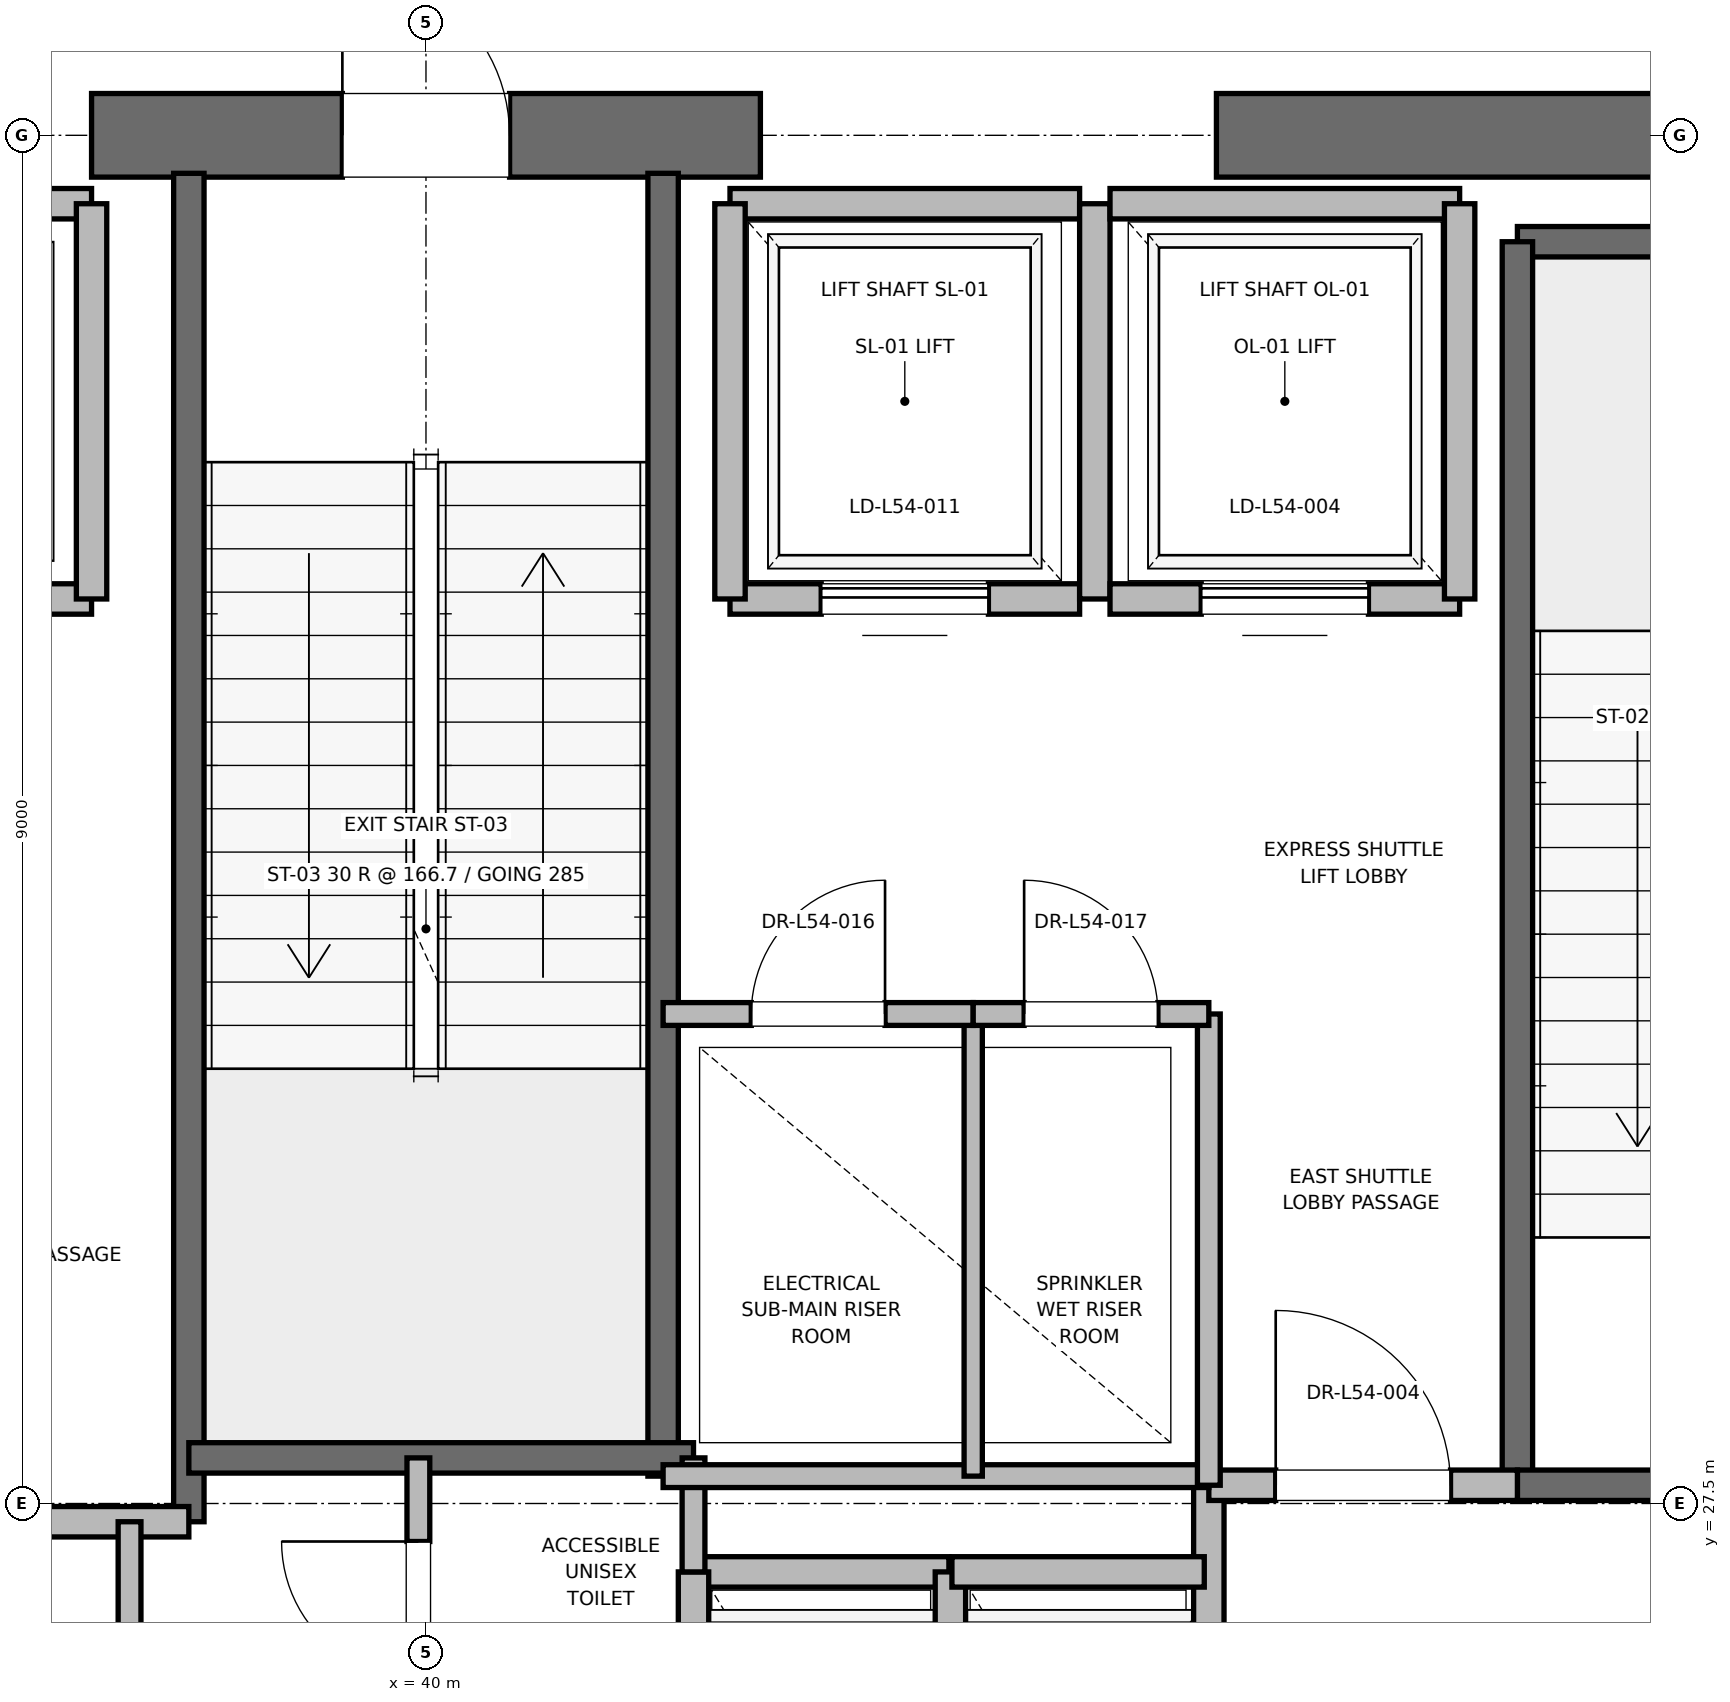
"""IFC4 building model, lengths in metres.
Left out: names, types, materials, properties, quantities, classifications, styles, units other than length and angle.
Written with IfcOpenShell. Run it as: python <this file> out.ifc"""

import sys

from ifc_helpers import new_model, si_unit, direction, frame, frame_2d, origin, place, context, subcontext, project, spatial, rectangle, extrude, element, fill, save


model = new_model("IFC4")
c1 = context("Model", 3, precision=1e-05, world=origin(), true_north=direction((0.0, 1.0)))
c2 = subcontext(c1, "Body", "Model", "MODEL_VIEW")
j1 = project(units=[si_unit("LENGTHUNIT", "METRE"), si_unit("PLANEANGLEUNIT", "RADIAN")], contexts=[c1])
p1 = place(None, origin())
s1 = spatial("IfcSite", under=j1, at=p1, CompositionType="ELEMENT")
p2 = place(p1, origin())
s2 = spatial("IfcBuilding", under=s1, at=p2, CompositionType="ELEMENT")
p3 = place(p2, frame((0.0, 0.0, 233.2)))
s3 = spatial("IfcBuildingStorey", under=s2, at=p3, CompositionType="ELEMENT", Elevation=233.2)
p4 = place(p3, frame((37.8, 36.5, 0.0), z_axis=(0.0, 0.0, 1.0), x_axis=(1.0, 0.0, 0.0)))
e1 = element("IfcWall", 1, at=p4, inside=s3, PredefinedType="SHEAR", context=c2, shape_type="SweptSolid", body=[
    extrude(rectangle(XDim=4.4, YDim=0.55, at=frame_2d((2.2, 0.0))), origin(), (0.0, 0.0, 1.0), 4.7),
])
p5 = place(p4, frame((1.65, 0.0, 0.0)))
e2 = element("IfcOpeningElement", 2, at=p5, cuts=e1, PredefinedType="OPENING", context=c2, shape_type="SweptSolid", body=[
    extrude(rectangle(XDim=1.1, YDim=2.15, at=frame_2d((0.55, 1.075))), frame((0.0, 0.275, 0.0), z_axis=(0.0, -1.0, 0.0), x_axis=(1.0, 0.0, 0.0)), (0.0, 0.0, 1.0), 0.55),
])
p6 = place(p3, frame((45.2, 36.5, 0.0), z_axis=(0.0, 0.0, 1.0), x_axis=(1.0, 0.0, 0.0)))
e3 = element("IfcWall", 3, at=p6, inside=s3, PredefinedType="SHEAR", context=c2, shape_type="SweptSolid", body=[
    extrude(rectangle(XDim=5.8, YDim=0.55, at=frame_2d((2.9, 0.0))), origin(), (0.0, 0.0, 1.0), 4.7),
])
p7 = place(p3, frame((47.18, 35.8, 0.0), z_axis=(0.0, 0.0, 1.0), x_axis=(1.0, 0.0, 0.0)))
e4 = element("IfcWall", 4, at=p7, inside=s3, PredefinedType="SOLIDWALL", context=c2, shape_type="SweptSolid", body=[
    extrude(rectangle(XDim=3.12, YDim=0.2, at=frame_2d((1.56, 0.0))), origin(), (0.0, 0.0, 1.0), 4.7),
])
p8 = place(p3, frame((47.18, 27.62, 0.0), z_axis=(0.0, 0.0, 1.0), x_axis=(0.0, 1.0, 0.0)))
e5 = element("IfcWall", 5, at=p8, inside=s3, PredefinedType="SOLIDWALL", context=c2, shape_type="SweptSolid", body=[
    extrude(rectangle(XDim=8.18, YDim=0.2, at=frame_2d((4.09, 0.0))), origin(), (0.0, 0.0, 1.0), 4.7),
])
p9 = place(p3, frame((47.18, 27.62, 0.0), z_axis=(0.0, 0.0, 1.0), x_axis=(1.0, 0.0, 0.0)))
e6 = element("IfcWall", 6, at=p9, inside=s3, PredefinedType="SOLIDWALL", context=c2, shape_type="SweptSolid", body=[
    extrude(rectangle(XDim=3.12, YDim=0.2, at=frame_2d((1.56, 0.0))), origin(), (0.0, 0.0, 1.0), 4.7),
])
p10 = place(p9, frame((1.01, 0.0, 0.0)))
e7 = element("IfcOpeningElement", 7, at=p10, cuts=e6, PredefinedType="OPENING", context=c2, shape_type="SweptSolid", body=[
    extrude(rectangle(XDim=1.1, YDim=2.15, at=frame_2d((0.55, 1.075))), frame((0.0, 0.1, 0.0), z_axis=(0.0, -1.0, 0.0), x_axis=(1.0, 0.0, 0.0)), (0.0, 0.0, 1.0), 0.2),
])
p11 = place(p3, frame((38.44, 27.38, 0.0), z_axis=(0.0, 0.0, 1.0), x_axis=(0.0, 1.0, 0.0)))
e8 = element("IfcWall", 8, at=p11, inside=s3, PredefinedType="SOLIDWALL", context=c2, shape_type="SweptSolid", body=[
    extrude(rectangle(XDim=8.87, YDim=0.2, at=frame_2d((4.435, 0.0))), origin(), (0.0, 0.0, 1.0), 4.7),
])
p12 = place(p3, frame((41.56, 27.68, 0.0), z_axis=(0.0, 0.0, 1.0), x_axis=(0.0, 1.0, 0.0)))
e9 = element("IfcWall", 9, at=p12, inside=s3, PredefinedType="SOLIDWALL", context=c2, shape_type="SweptSolid", body=[
    extrude(rectangle(XDim=8.57, YDim=0.2, at=frame_2d((4.285, 0.0))), origin(), (0.0, 0.0, 1.0), 4.7),
])
p13 = place(p3, frame((38.44, 27.8, 0.0), z_axis=(0.0, 0.0, 1.0), x_axis=(1.0, 0.0, 0.0)))
e10 = element("IfcWall", 10, at=p13, inside=s3, PredefinedType="SOLIDWALL", context=c2, shape_type="SweptSolid", body=[
    extrude(rectangle(XDim=3.32, YDim=0.2, at=frame_2d((1.66, 0.0))), origin(), (0.0, 0.0, 1.0), 4.7),
])
p14 = place(p3, frame((32.82, 27.38, 0.0), z_axis=(0.0, 0.0, 1.0), x_axis=(1.0, 0.0, 0.0)))
e11 = element("IfcWall", 11, at=p14, inside=s3, PredefinedType="PARTITIONING", context=c2, shape_type="SweptSolid", body=[
    extrude(rectangle(XDim=5.62, YDim=0.2, at=frame_2d((2.81, 0.0))), origin(), (0.0, 0.0, 1.0), 4.7),
])
p15 = place(p3, frame((45.15, 24.25, 0.0), z_axis=(0.0, 0.0, 1.0), x_axis=(0.0, 1.0, 0.0)))
e12 = element("IfcWall", 12, at=p15, inside=s3, PredefinedType="PARTITIONING", context=c2, shape_type="SweptSolid", body=[
    extrude(rectangle(XDim=3.37, YDim=0.2, at=frame_2d((1.685, 0.0))), origin(), (0.0, 0.0, 1.0), 4.7),
])
p16 = place(p3, frame((45.15, 27.62, 0.0), z_axis=(0.0, 0.0, 1.0), x_axis=(1.0, 0.0, 0.0)))
e13 = element("IfcWall", 13, at=p16, inside=s3, PredefinedType="PARTITIONING", context=c2, shape_type="SweptSolid", body=[
    extrude(rectangle(XDim=2.03, YDim=0.2, at=frame_2d((1.015, 0.0))), origin(), (0.0, 0.0, 1.0), 4.7),
])
p17 = place(p16, frame((0.44, 0.0, 0.0)))
e14 = element("IfcOpeningElement", 14, at=p17, cuts=e13, PredefinedType="OPENING", context=c2, shape_type="SweptSolid", body=[
    extrude(rectangle(XDim=1.15, YDim=2.2, at=frame_2d((0.575, 1.1))), frame((0.0, 0.1, 0.0), z_axis=(0.0, -1.0, 0.0), x_axis=(1.0, 0.0, 0.0)), (0.0, 0.0, 1.0), 0.2),
])
p18 = place(p3, frame((43.44, 27.05, 0.0), z_axis=(0.0, 0.0, 1.0), x_axis=(-1.0, 0.0, 0.0)))
e15 = element("IfcWall", 15, at=p18, inside=s3, PredefinedType="SOLIDWALL", context=c2, shape_type="SweptSolid", body=[
    extrude(rectangle(XDim=1.68, YDim=0.2, at=frame_2d((0.84, 0.0))), origin(), (0.0, 0.0, 1.0), 4.7),
])
for number, where, z_axis, x_axis in (
    (16, (41.76, 27.05, 0.0), (0.0, 0.0, 1.0), (0.0, -1.0, 0.0)),
    (17, (43.45, 24.45, 0.0), (0.0, 0.0, 1.0), (0.0, 1.0, 0.0)),
):
    element("IfcWall", number, at=place(p3, frame(where, z_axis=z_axis, x_axis=x_axis)), inside=s3, PredefinedType="SOLIDWALL", context=c2, shape_type="SweptSolid", body=[
        extrude(rectangle(XDim=2.6, YDim=0.2, at=frame_2d((1.3, 0.0))), origin(), (0.0, 0.0, 1.0), 4.7),
    ])
p19 = place(p3, frame((45.12, 27.05, 0.0), z_axis=(0.0, 0.0, 1.0), x_axis=(-1.0, 0.0, 0.0)))
e18 = element("IfcWall", 18, at=p19, inside=s3, PredefinedType="SOLIDWALL", context=c2, shape_type="SweptSolid", body=[
    extrude(rectangle(XDim=1.66, YDim=0.2, at=frame_2d((0.83, 0.0))), origin(), (0.0, 0.0, 1.0), 4.7),
])
p20 = place(p3, frame((35.5, 33.45, 0.0), z_axis=(0.0, 0.0, 1.0), x_axis=(1.0, 0.0, 0.0)))
e19 = element("IfcWall", 19, at=p20, inside=s3, PredefinedType="SOLIDWALL", context=c2, shape_type="SweptSolid", body=[
    extrude(rectangle(XDim=2.3, YDim=0.2, at=frame_2d((1.15, 0.0))), origin(), (0.0, 0.0, 1.0), 4.7),
])
p21 = place(p20, frame((0.6, 0.0, 0.0)))
e20 = element("IfcOpeningElement", 20, at=p21, cuts=e19, PredefinedType="OPENING", context=c2, shape_type="SweptSolid", body=[
    extrude(rectangle(XDim=1.1, YDim=2.2, at=frame_2d((0.55, 1.1))), frame((0.0, 0.1, 0.0), z_axis=(0.0, -1.0, 0.0), x_axis=(1.0, 0.0, 0.0)), (0.0, 0.0, 1.0), 0.2),
])
p22 = place(p3, frame((37.8, 36.05, 0.0), z_axis=(0.0, 0.0, 1.0), x_axis=(-1.0, 0.0, 0.0)))
e21 = element("IfcWall", 21, at=p22, inside=s3, PredefinedType="SOLIDWALL", context=c2, shape_type="SweptSolid", body=[
    extrude(rectangle(XDim=2.3, YDim=0.2, at=frame_2d((1.15, 0.0))), origin(), (0.0, 0.0, 1.0), 3.68),
])
p23 = place(p3, frame((37.8, 33.45, 0.0), z_axis=(0.0, 0.0, 1.0), x_axis=(0.0, 1.0, 0.0)))
e22 = element("IfcWall", 22, at=p23, inside=s3, PredefinedType="SOLIDWALL", context=c2, shape_type="SweptSolid", body=[
    extrude(rectangle(XDim=2.6, YDim=0.2, at=frame_2d((1.3, 0.0))), origin(), (0.0, 0.0, 1.0), 3.68),
])
p24 = place(p3, frame((42.0, 33.45, 0.0), z_axis=(0.0, 0.0, 1.0), x_axis=(1.0, 0.0, 0.0)))
e23 = element("IfcWall", 23, at=p24, inside=s3, PredefinedType="SOLIDWALL", context=c2, shape_type="SweptSolid", body=[
    extrude(rectangle(XDim=2.3, YDim=0.2, at=frame_2d((1.15, 0.0))), origin(), (0.0, 0.0, 1.0), 4.7),
])
p25 = place(p24, frame((0.6, 0.0, 0.0)))
e24 = element("IfcOpeningElement", 24, at=p25, cuts=e23, PredefinedType="OPENING", context=c2, shape_type="SweptSolid", body=[
    extrude(rectangle(XDim=1.1, YDim=2.2, at=frame_2d((0.55, 1.1))), frame((0.0, 0.1, 0.0), z_axis=(0.0, -1.0, 0.0), x_axis=(1.0, 0.0, 0.0)), (0.0, 0.0, 1.0), 0.2),
])
p26 = place(p3, frame((44.3, 36.05, 0.0), z_axis=(0.0, 0.0, 1.0), x_axis=(-1.0, 0.0, 0.0)))
e25 = element("IfcWall", 25, at=p26, inside=s3, PredefinedType="SOLIDWALL", context=c2, shape_type="SweptSolid", body=[
    extrude(rectangle(XDim=2.3, YDim=0.2, at=frame_2d((1.15, 0.0))), origin(), (0.0, 0.0, 1.0), 3.68),
])
for number, where, z_axis, x_axis in (
    (26, (42.0, 36.05, 0.0), (0.0, 0.0, 1.0), (0.0, -1.0, 0.0)),
    (27, (44.4, 33.45, 0.0), (0.0, 0.0, 1.0), (0.0, 1.0, 0.0)),
):
    element("IfcWall", number, at=place(p3, frame(where, z_axis=z_axis, x_axis=x_axis)), inside=s3, PredefinedType="SOLIDWALL", context=c2, shape_type="SweptSolid", body=[
        extrude(rectangle(XDim=2.6, YDim=0.2, at=frame_2d((1.3, 0.0))), origin(), (0.0, 0.0, 1.0), 3.68),
    ])
p27 = place(p3, frame((44.5, 33.45, 0.0), z_axis=(0.0, 0.0, 1.0), x_axis=(1.0, 0.0, 0.0)))
e28 = element("IfcWall", 28, at=p27, inside=s3, PredefinedType="SOLIDWALL", context=c2, shape_type="SweptSolid", body=[
    extrude(rectangle(XDim=2.3, YDim=0.2, at=frame_2d((1.15, 0.0))), origin(), (0.0, 0.0, 1.0), 4.7),
])
p28 = place(p27, frame((0.6, 0.0, 0.0)))
e29 = element("IfcOpeningElement", 29, at=p28, cuts=e28, PredefinedType="OPENING", context=c2, shape_type="SweptSolid", body=[
    extrude(rectangle(XDim=1.1, YDim=2.2, at=frame_2d((0.55, 1.1))), frame((0.0, 0.1, 0.0), z_axis=(0.0, -1.0, 0.0), x_axis=(1.0, 0.0, 0.0)), (0.0, 0.0, 1.0), 0.2),
])
p29 = place(p3, frame((46.8, 36.05, 0.0), z_axis=(0.0, 0.0, 1.0), x_axis=(-1.0, 0.0, 0.0)))
e30 = element("IfcWall", 30, at=p29, inside=s3, PredefinedType="SOLIDWALL", context=c2, shape_type="SweptSolid", body=[
    extrude(rectangle(XDim=2.3, YDim=0.2, at=frame_2d((1.15, 0.0))), origin(), (0.0, 0.0, 1.0), 3.68),
])
p30 = place(p3, frame((46.8, 33.45, 0.0), z_axis=(0.0, 0.0, 1.0), x_axis=(0.0, 1.0, 0.0)))
e31 = element("IfcWall", 31, at=p30, inside=s3, PredefinedType="SOLIDWALL", context=c2, shape_type="SweptSolid", body=[
    extrude(rectangle(XDim=2.6, YDim=0.2, at=frame_2d((1.3, 0.0))), origin(), (0.0, 0.0, 1.0), 4.7),
])
p31 = place(p3, frame((41.76, 27.05, 0.0), z_axis=(0.0, 0.0, 1.0), x_axis=(0.0, 1.0, 0.0)))
e32 = element("IfcWall", 32, at=p31, inside=s3, PredefinedType="PARTITIONING", context=c2, shape_type="SweptSolid", body=[
    extrude(rectangle(XDim=0.75, YDim=0.15, at=frame_2d((0.375, 0.0))), origin(), (0.0, 0.0, 1.0), 2.85),
])
p32 = place(p3, frame((39.95, 25.8, 0.0), z_axis=(0.0, 0.0, 1.0), x_axis=(0.0, 1.0, 0.0)))
e33 = element("IfcWall", 33, at=p32, inside=s3, PredefinedType="PARTITIONING", context=c2, shape_type="SweptSolid", body=[
    extrude(rectangle(XDim=2.0, YDim=0.15, at=frame_2d((1.0, 0.0))), origin(), (0.0, 0.0, 1.0), 2.85),
])
p33 = place(p32, frame((0.55, 0.0, 0.0)))
e34 = element("IfcOpeningElement", 34, at=p33, cuts=e33, PredefinedType="OPENING", context=c2, shape_type="SweptSolid", body=[
    extrude(rectangle(XDim=0.9, YDim=2.1, at=frame_2d((0.45, 1.05))), frame((0.0, 0.075, 0.0), z_axis=(0.0, -1.0, 0.0), x_axis=(1.0, 0.0, 0.0)), (0.0, 0.0, 1.0), 0.15),
])
p34 = place(p3, frame((38.05, 24.5, 0.0), z_axis=(0.0, 0.0, 1.0), x_axis=(0.0, 1.0, 0.0)))
e35 = element("IfcWall", 35, at=p34, inside=s3, PredefinedType="PARTITIONING", context=c2, shape_type="SweptSolid", body=[
    extrude(rectangle(XDim=2.88, YDim=0.15, at=frame_2d((1.44, 0.0))), origin(), (0.0, 0.0, 1.0), 2.85),
])
p35 = place(p34, frame((0.94, 0.0, 0.0)))
e36 = element("IfcOpeningElement", 36, at=p35, cuts=e35, PredefinedType="OPENING", context=c2, shape_type="SweptSolid", body=[
    extrude(rectangle(XDim=1.0, YDim=2.15, at=frame_2d((0.5, 1.075))), frame((0.0, 0.075, 0.0), z_axis=(0.0, -1.0, 0.0), x_axis=(1.0, 0.0, 0.0)), (0.0, 0.0, 1.0), 0.15),
])
p36 = place(p3, frame((41.56, 27.68, 0.0), z_axis=(0.0, 0.0, 1.0), x_axis=(1.0, 0.0, 0.0)))
e37 = element("IfcWall", 37, at=p36, inside=s3, PredefinedType="PARTITIONING", context=c2, shape_type="SweptSolid", body=[
    extrude(rectangle(XDim=3.59, YDim=0.15, at=frame_2d((1.795, 0.0))), origin(), (0.0, 0.0, 1.0), 2.85),
])
p37 = place(p3, frame((45.15, 27.62, 0.0), z_axis=(0.0, 0.0, 1.0), x_axis=(0.0, 1.0, 0.0)))
e38 = element("IfcWall", 38, at=p37, inside=s3, PredefinedType="PARTITIONING", context=c2, shape_type="SweptSolid", body=[
    extrude(rectangle(XDim=3.1, YDim=0.15, at=frame_2d((1.55, 0.0))), origin(), (0.0, 0.0, 1.0), 2.85),
])
p38 = place(p3, frame((43.6, 27.68, 0.0), z_axis=(0.0, 0.0, 1.0), x_axis=(0.0, 1.0, 0.0)))
e39 = element("IfcWall", 39, at=p38, inside=s3, PredefinedType="PARTITIONING", context=c2, shape_type="SweptSolid", body=[
    extrude(rectangle(XDim=3.04, YDim=0.12, at=frame_2d((1.52, 0.0))), origin(), (0.0, 0.0, 1.0), 2.85),
])
p39 = place(p3, frame((41.56, 30.72, 0.0), z_axis=(0.0, 0.0, 1.0), x_axis=(1.0, 0.0, 0.0)))
e40 = element("IfcWall", 40, at=p39, inside=s3, PredefinedType="PARTITIONING", context=c2, shape_type="SweptSolid", body=[
    extrude(rectangle(XDim=2.04, YDim=0.15, at=frame_2d((1.02, 0.0))), origin(), (0.0, 0.0, 1.0), 2.85),
])
p40 = place(p39, frame((0.58, 0.0, 0.0)))
e41 = element("IfcOpeningElement", 41, at=p40, cuts=e40, PredefinedType="OPENING", context=c2, shape_type="SweptSolid", body=[
    extrude(rectangle(XDim=0.88, YDim=2.1, at=frame_2d((0.44, 1.05))), frame((0.0, 0.075, 0.0), z_axis=(0.0, -1.0, 0.0), x_axis=(1.0, 0.0, 0.0)), (0.0, 0.0, 1.0), 0.15),
])
p41 = place(p3, frame((43.6, 30.72, 0.0), z_axis=(0.0, 0.0, 1.0), x_axis=(1.0, 0.0, 0.0)))
e42 = element("IfcWall", 42, at=p41, inside=s3, PredefinedType="PARTITIONING", context=c2, shape_type="SweptSolid", body=[
    extrude(rectangle(XDim=1.55, YDim=0.15, at=frame_2d((0.775, 0.0))), origin(), (0.0, 0.0, 1.0), 2.85),
])
p42 = place(p41, frame((0.335, 0.0, 0.0)))
e43 = element("IfcOpeningElement", 43, at=p42, cuts=e42, PredefinedType="OPENING", context=c2, shape_type="SweptSolid", body=[
    extrude(rectangle(XDim=0.88, YDim=2.1, at=frame_2d((0.44, 1.05))), frame((0.0, 0.075, 0.0), z_axis=(0.0, -1.0, 0.0), x_axis=(1.0, 0.0, 0.0)), (0.0, 0.0, 1.0), 0.15),
])
p43 = place(p5, origin())
e44 = element("IfcDoor", 44, at=p43, inside=s3, OperationType="SINGLE_SWING_LEFT", PredefinedType="DOOR", context=c2, shape_type="SweptSolid", body=[
    extrude(rectangle(XDim=1.1, YDim=2.15, at=frame_2d((0.55, 1.075))), frame((0.0, 0.025, 0.0), z_axis=(0.0, -1.0, 0.0), x_axis=(1.0, 0.0, 0.0)), (0.0, 0.0, 1.0), 0.05),
])
fill(e2, e44)
p44 = place(p17, origin())
e45 = element("IfcDoor", 45, at=p44, inside=s3, OperationType="SINGLE_SWING_LEFT", PredefinedType="DOOR", context=c2, shape_type="SweptSolid", body=[
    extrude(rectangle(XDim=1.15, YDim=2.2, at=frame_2d((0.575, 1.1))), frame((0.0, 0.025, 0.0), z_axis=(0.0, -1.0, 0.0), x_axis=(1.0, 0.0, 0.0)), (0.0, 0.0, 1.0), 0.05),
])
fill(e14, e45)
p45 = place(p25, origin())
e46 = element("IfcDoor", 46, at=p45, inside=s3, OperationType="SLIDING_TO_RIGHT", PredefinedType="DOOR", context=c2, shape_type="SweptSolid", body=[
    extrude(rectangle(XDim=1.1, YDim=2.2, at=frame_2d((0.55, 1.1))), frame((0.0, 0.025, 0.0), z_axis=(0.0, -1.0, 0.0), x_axis=(1.0, 0.0, 0.0)), (0.0, 0.0, 1.0), 0.05),
])
fill(e24, e46)
p46 = place(p28, origin())
e47 = element("IfcDoor", 47, at=p46, inside=s3, OperationType="SLIDING_TO_RIGHT", PredefinedType="DOOR", context=c2, shape_type="SweptSolid", body=[
    extrude(rectangle(XDim=1.1, YDim=2.2, at=frame_2d((0.55, 1.1))), frame((0.0, 0.025, 0.0), z_axis=(0.0, -1.0, 0.0), x_axis=(1.0, 0.0, 0.0)), (0.0, 0.0, 1.0), 0.05),
])
fill(e29, e47)
p47 = place(p33, origin())
e48 = element("IfcDoor", 48, at=p47, inside=s3, OperationType="SINGLE_SWING_RIGHT", PredefinedType="DOOR", context=c2, shape_type="SweptSolid", body=[
    extrude(rectangle(XDim=0.9, YDim=2.1, at=frame_2d((0.45, 1.05))), frame((0.0, 0.025, 0.0), z_axis=(0.0, -1.0, 0.0), x_axis=(1.0, 0.0, 0.0)), (0.0, 0.0, 1.0), 0.05),
])
fill(e34, e48)
p48 = place(p40, origin())
e49 = element("IfcDoor", 49, at=p48, inside=s3, OperationType="SINGLE_SWING_RIGHT", PredefinedType="DOOR", context=c2, shape_type="SweptSolid", body=[
    extrude(rectangle(XDim=0.88, YDim=2.1, at=frame_2d((0.44, 1.05))), frame((0.0, 0.025, 0.0), z_axis=(0.0, -1.0, 0.0), x_axis=(1.0, 0.0, 0.0)), (0.0, 0.0, 1.0), 0.05),
])
fill(e41, e49)
p49 = place(p42, origin())
e50 = element("IfcDoor", 50, at=p49, inside=s3, OperationType="SINGLE_SWING_LEFT", PredefinedType="DOOR", context=c2, shape_type="SweptSolid", body=[
    extrude(rectangle(XDim=0.88, YDim=2.1, at=frame_2d((0.44, 1.05))), frame((0.0, 0.025, 0.0), z_axis=(0.0, -1.0, 0.0), x_axis=(1.0, 0.0, 0.0)), (0.0, 0.0, 1.0), 0.05),
])
fill(e43, e50)
save(model, sys.argv[1])
